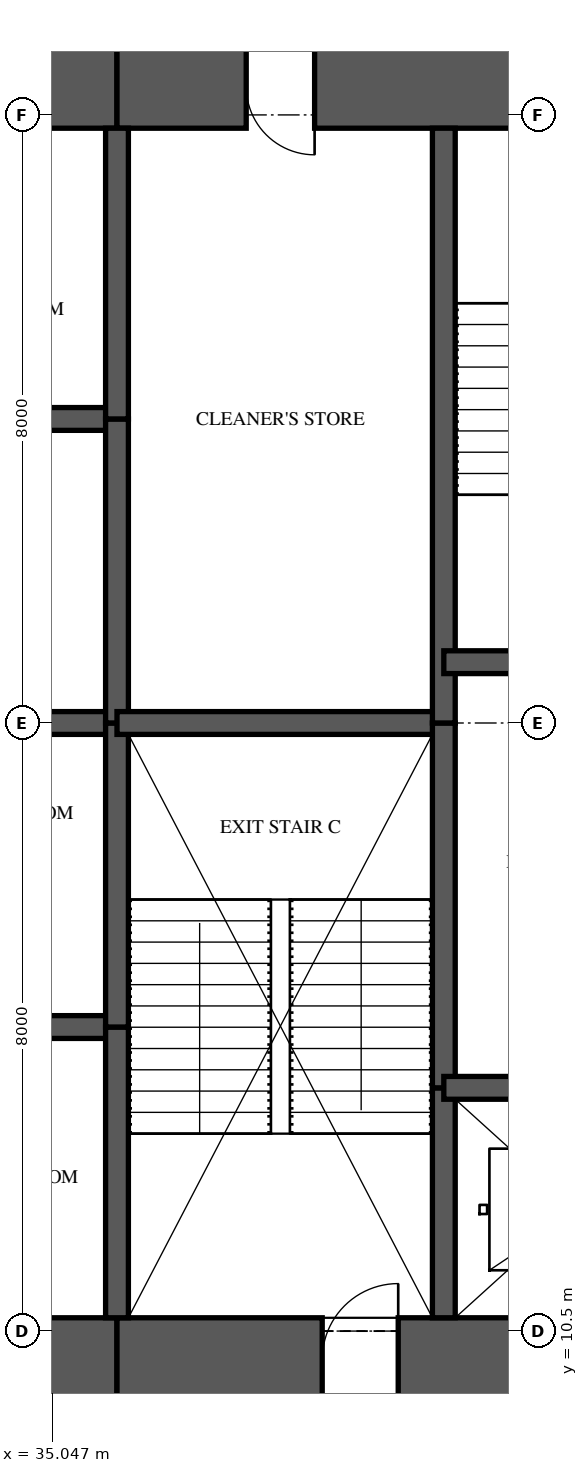
"""IFC4 building model, lengths in metres.
Left out: names, types, materials, properties, quantities, classifications, styles, units other than length and angle.
Written with IfcOpenShell. Run it as: python <this file> out.ifc"""

import sys

from ifc_helpers import new_model, si_unit, direction, frame, frame_2d, origin, place, context, subcontext, project, spatial, rectangle, extrude, element, fill, save


model = new_model("IFC4")
c1 = context("Model", 3, precision=1e-05, world=origin(), true_north=direction((0.0, 1.0)))
c2 = subcontext(c1, "Body", "Model", "MODEL_VIEW")
j1 = project(units=[si_unit("LENGTHUNIT", "METRE"), si_unit("PLANEANGLEUNIT", "RADIAN")], contexts=[c1])
p1 = place(None, origin())
s1 = spatial("IfcSite", under=j1, at=p1, CompositionType="ELEMENT")
p2 = place(p1, origin())
s2 = spatial("IfcBuilding", under=s1, at=p2, CompositionType="ELEMENT")
p3 = place(p2, frame((0.0, 0.0, 217.95)))
s3 = spatial("IfcBuildingStorey", under=s2, at=p3, CompositionType="ELEMENT", Elevation=217.95)
p4 = place(p3, frame((31.6, 10.125, 0.0), z_axis=(0.0, 0.0, 1.0), x_axis=(1.0, 0.0, 0.0)))
e1 = element("IfcWall", 1, at=p4, inside=s3, PredefinedType="SHEAR", context=c2, shape_type="SweptSolid", body=[
    extrude(rectangle(XDim=4.3, YDim=1.1, at=frame_2d((2.15, 0.0))), origin(), (0.0, 0.0, 1.0), 3.5),
])
p5 = place(p3, frame((35.9, 10.125, 0.0), z_axis=(0.0, 0.0, 1.0), x_axis=(1.0, 0.0, 0.0)))
e2 = element("IfcWall", 2, at=p5, inside=s3, PredefinedType="SHEAR", context=c2, shape_type="SweptSolid", body=[
    extrude(rectangle(XDim=8.175, YDim=1.1, at=frame_2d((4.087, 0.0))), origin(), (0.0, 0.0, 1.0), 3.5),
])
p6 = place(p5, frame((2.7, 0.0, 0.0)))
e3 = element("IfcOpeningElement", 3, at=p6, cuts=e2, PredefinedType="OPENING", context=c2, shape_type="SweptSolid", body=[
    extrude(rectangle(XDim=1.0, YDim=2.1, at=frame_2d((0.5, 1.05))), frame((0.0, 0.56, 0.0), z_axis=(0.0, -1.0, 0.0), x_axis=(1.0, 0.0, 0.0)), (0.0, 0.0, 1.0), 1.12),
])
p7 = place(p3, frame((44.075, 26.875, 0.0), z_axis=(0.0, 0.0, 1.0), x_axis=(-1.0, 0.0, 0.0)))
e4 = element("IfcWall", 4, at=p7, inside=s3, PredefinedType="SHEAR", context=c2, shape_type="SweptSolid", body=[
    extrude(rectangle(XDim=8.175, YDim=1.1, at=frame_2d((4.087, 0.0))), origin(), (0.0, 0.0, 1.0), 3.5),
])
p8 = place(p7, frame((5.575, 0.0, 0.0)))
e5 = element("IfcOpeningElement", 5, at=p8, cuts=e4, PredefinedType="OPENING", context=c2, shape_type="SweptSolid", body=[
    extrude(rectangle(XDim=0.9, YDim=2.1, at=frame_2d((0.45, 1.05))), frame((0.0, 0.56, 0.0), z_axis=(0.0, -1.0, 0.0), x_axis=(1.0, 0.0, 0.0)), (0.0, 0.0, 1.0), 1.12),
])
p9 = place(p3, frame((35.9, 26.875, 0.0), z_axis=(0.0, 0.0, 1.0), x_axis=(-1.0, 0.0, 0.0)))
e6 = element("IfcWall", 6, at=p9, inside=s3, PredefinedType="SHEAR", context=c2, shape_type="SweptSolid", body=[
    extrude(rectangle(XDim=4.3, YDim=1.1, at=frame_2d((2.15, 0.0))), origin(), (0.0, 0.0, 1.0), 3.5),
])
p10 = place(p3, frame((35.9, 10.675, 0.0), z_axis=(0.0, 0.0, 1.0), x_axis=(0.0, 1.0, 0.0)))
e7 = element("IfcWall", 7, at=p10, inside=s3, PredefinedType="SHEAR", context=c2, shape_type="SweptSolid", body=[
    extrude(rectangle(XDim=3.825, YDim=0.3, at=frame_2d((1.913, 0.0))), origin(), (0.0, 0.0, 1.0), 3.5),
])
for number, where, z_axis, x_axis in (
    (8, (35.9, 14.5, 0.0), (0.0, 0.0, 1.0), (0.0, 1.0, 0.0)),
    (9, (35.9, 18.5, 0.0), (0.0, 0.0, 1.0), (0.0, 1.0, 0.0)),
):
    element("IfcWall", number, at=place(p3, frame(where, z_axis=z_axis, x_axis=x_axis)), inside=s3, PredefinedType="SHEAR", context=c2, shape_type="SweptSolid", body=[
        extrude(rectangle(XDim=4.0, YDim=0.3, at=frame_2d((2.0, 0.0))), origin(), (0.0, 0.0, 1.0), 3.5),
    ])
p11 = place(p3, frame((35.9, 22.5, 0.0), z_axis=(0.0, 0.0, 1.0), x_axis=(0.0, 1.0, 0.0)))
e10 = element("IfcWall", 10, at=p11, inside=s3, PredefinedType="SHEAR", context=c2, shape_type="SweptSolid", body=[
    extrude(rectangle(XDim=3.825, YDim=0.3, at=frame_2d((1.913, 0.0))), origin(), (0.0, 0.0, 1.0), 3.5),
])
p12 = place(p3, frame((40.2, 10.675, 0.0), z_axis=(0.0, 0.0, 1.0), x_axis=(0.0, 1.0, 0.0)))
e11 = element("IfcWall", 11, at=p12, inside=s3, PredefinedType="SHEAR", context=c2, shape_type="SweptSolid", body=[
    extrude(rectangle(XDim=3.025, YDim=0.3, at=frame_2d((1.512, 0.0))), origin(), (0.0, 0.0, 1.0), 3.5),
])
p13 = place(p3, frame((40.2, 13.7, 0.0), z_axis=(0.0, 0.0, 1.0), x_axis=(0.0, 1.0, 0.0)))
e12 = element("IfcWall", 12, at=p13, inside=s3, PredefinedType="SHEAR", context=c2, shape_type="SweptSolid", body=[
    extrude(rectangle(XDim=4.8, YDim=0.3, at=frame_2d((2.4, 0.0))), origin(), (0.0, 0.0, 1.0), 3.5),
])
p14 = place(p3, frame((40.2, 18.5, 0.0), z_axis=(0.0, 0.0, 1.0), x_axis=(0.0, 1.0, 0.0)))
e13 = element("IfcWall", 13, at=p14, inside=s3, PredefinedType="SHEAR", context=c2, shape_type="SweptSolid", body=[
    extrude(rectangle(XDim=7.825, YDim=0.3, at=frame_2d((3.913, 0.0))), origin(), (0.0, 0.0, 1.0), 3.5),
])
for number, where, z_axis, x_axis in (
    (14, (31.6, 14.5, 0.0), (0.0, 0.0, 1.0), (1.0, 0.0, 0.0)),
    (15, (31.6, 18.5, 0.0), (0.0, 0.0, 1.0), (1.0, 0.0, 0.0)),
    (16, (31.6, 22.5, 0.0), (0.0, 0.0, 1.0), (1.0, 0.0, 0.0)),
):
    element("IfcWall", number, at=place(p3, frame(where, z_axis=z_axis, x_axis=x_axis)), inside=s3, PredefinedType="SHEAR", context=c2, shape_type="SweptSolid", body=[
        extrude(rectangle(XDim=4.3, YDim=0.3, at=frame_2d((2.15, 0.0))), origin(), (0.0, 0.0, 1.0), 3.5),
    ])
p15 = place(p3, frame((35.9, 18.5, 0.0), z_axis=(0.0, 0.0, 1.0), x_axis=(1.0, 0.0, 0.0)))
e17 = element("IfcWall", 17, at=p15, inside=s3, PredefinedType="SHEAR", context=c2, shape_type="SweptSolid", body=[
    extrude(rectangle(XDim=4.3, YDim=0.3, at=frame_2d((2.15, 0.0))), origin(), (0.0, 0.0, 1.0), 3.5),
])
p16 = place(p3, frame((40.2, 13.7, 0.0), z_axis=(0.0, 0.0, 1.0), x_axis=(1.0, 0.0, 0.0)))
e18 = element("IfcWall", 18, at=p16, inside=s3, PredefinedType="SHEAR", context=c2, shape_type="SweptSolid", body=[
    extrude(rectangle(XDim=3.6, YDim=0.3, at=frame_2d((1.8, 0.0))), origin(), (0.0, 0.0, 1.0), 3.5),
])
p17 = place(p16, frame((1.2, 0.0, 0.0)))
e19 = element("IfcOpeningElement", 19, at=p17, cuts=e18, PredefinedType="OPENING", context=c2, shape_type="SweptSolid", body=[
    extrude(rectangle(XDim=1.2, YDim=2.1, at=frame_2d((0.6, 1.05))), frame((0.0, 0.16, 0.0), z_axis=(0.0, -1.0, 0.0), x_axis=(1.0, 0.0, 0.0)), (0.0, 0.0, 1.0), 0.32),
])
p18 = place(p3, frame((40.2, 19.3, 0.0), z_axis=(0.0, 0.0, 1.0), x_axis=(1.0, 0.0, 0.0)))
e20 = element("IfcWall", 20, at=p18, inside=s3, PredefinedType="SHEAR", context=c2, shape_type="SweptSolid", body=[
    extrude(rectangle(XDim=3.6, YDim=0.3, at=frame_2d((1.8, 0.0))), origin(), (0.0, 0.0, 1.0), 3.5),
])
p19 = place(p18, frame((1.3, 0.0, 0.0)))
e21 = element("IfcOpeningElement", 21, at=p19, cuts=e20, PredefinedType="OPENING", context=c2, shape_type="SweptSolid", body=[
    extrude(rectangle(XDim=1.0, YDim=2.1, at=frame_2d((0.5, 1.05))), frame((0.0, 0.16, 0.0), z_axis=(0.0, -1.0, 0.0), x_axis=(1.0, 0.0, 0.0)), (0.0, 0.0, 1.0), 0.32),
])
p20 = place(p6, origin())
e22 = element("IfcDoor", 22, at=p20, inside=s3, OperationType="SINGLE_SWING_RIGHT", PredefinedType="DOOR", context=c2, shape_type="SweptSolid", body=[
    extrude(rectangle(XDim=1.0, YDim=2.1, at=frame_2d((0.5, 1.05))), frame((0.0, 0.025, 0.0), z_axis=(0.0, -1.0, 0.0), x_axis=(1.0, 0.0, 0.0)), (0.0, 0.0, 1.0), 0.05),
])
fill(e3, e22)
p21 = place(p8, origin())
e23 = element("IfcDoor", 23, at=p21, inside=s3, OperationType="SINGLE_SWING_LEFT", PredefinedType="DOOR", context=c2, shape_type="SweptSolid", body=[
    extrude(rectangle(XDim=0.9, YDim=2.1, at=frame_2d((0.45, 1.05))), frame((0.0, 0.47, 0.0), z_axis=(0.0, -1.0, 0.0), x_axis=(1.0, 0.0, 0.0)), (0.0, 0.0, 1.0), 0.8),
])
fill(e5, e23)
save(model, sys.argv[1])
